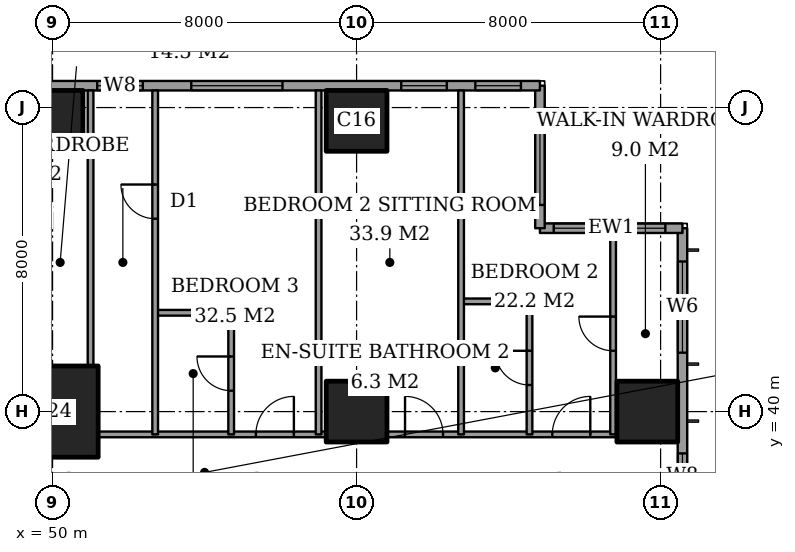
"""IFC4 building model, lengths in metres.
Left out: names, types, materials, properties, quantities, classifications, styles, units other than length and angle.
Written with IfcOpenShell. Run it as: python <this file> out.ifc"""

import sys

from ifc_helpers import new_model, si_unit, direction, frame, frame_2d, origin, origin_2d, place, context, subcontext, project, spatial, rectangle, extrude, element, fill, save


model = new_model("IFC4")
c1 = context("Model", 3, precision=1e-05, world=origin(), true_north=direction((0.0, 1.0)))
c2 = subcontext(c1, "Body", "Model", "MODEL_VIEW")
j1 = project(units=[si_unit("LENGTHUNIT", "METRE"), si_unit("PLANEANGLEUNIT", "RADIAN")], contexts=[c1])
p1 = place(None, origin())
s1 = spatial("IfcSite", under=j1, at=p1, CompositionType="ELEMENT")
p2 = place(p1, origin())
s2 = spatial("IfcBuilding", under=s1, at=p2, CompositionType="ELEMENT")
p3 = place(p2, frame((0.0, 0.0, 259.2)))
s3 = spatial("IfcBuildingStorey", under=s2, at=p3, CompositionType="ELEMENT", Elevation=259.2)
p4 = place(p3, frame((50.0, 40.0, 0.0), z_axis=(0.0, 0.0, 1.0), x_axis=(1.0, 0.0, 0.0)))
e1 = element("IfcColumn", 1, at=p4, inside=s3, PredefinedType="COLUMN", context=c2, shape_type="SweptSolid", body=[
    extrude(rectangle(XDim=2.4, YDim=2.4, at=origin_2d()), origin(), (0.0, 0.0, 1.0), 3.6),
])
for number, where, z_axis, x_axis in (
    (2, (50.0, 47.65, 0.0), (0.0, 0.0, 1.0), (1.0, 0.0, 0.0)),
    (3, (58.0, 40.0, 0.0), (0.0, 0.0, 1.0), (1.0, 0.0, 0.0)),
    (4, (58.0, 47.65, 0.0), (0.0, 0.0, 1.0), (1.0, 0.0, 0.0)),
    (5, (65.65, 40.0, 0.0), (0.0, 0.0, 1.0), (1.0, 0.0, 0.0)),
):
    element("IfcColumn", number, at=place(p3, frame(where, z_axis=z_axis, x_axis=x_axis)), inside=s3, PredefinedType="COLUMN", context=c2, shape_type="SweptSolid", body=[
        extrude(rectangle(XDim=1.6, YDim=1.6, at=origin_2d()), origin(), (0.0, 0.0, 1.0), 3.6),
    ])
p5 = place(p3, frame((66.575, 3.175, 0.0), z_axis=(0.0, 0.0, 1.0), x_axis=(0.0, 1.0, 0.0)))
e6 = element("IfcWall", 6, at=p5, inside=s3, PredefinedType="SOLIDWALL", context=c2, shape_type="SweptSolid", body=[
    extrude(rectangle(XDim=41.65, YDim=0.25, at=frame_2d((20.825, 0.0))), origin(), (0.0, 0.0, 1.0), 3.6),
])
p6 = place(p5, frame((0.875, 0.0, 0.6)))
e7 = element("IfcOpeningElement", 7, at=p6, cuts=e6, PredefinedType="OPENING", context=c2, shape_type="SweptSolid", body=[
    extrude(rectangle(XDim=2.4, YDim=2.0, at=frame_2d((1.2, 1.0))), frame((0.0, 0.135, 0.0), z_axis=(0.0, -1.0, 0.0), x_axis=(1.0, 0.0, 0.0)), (0.0, 0.0, 1.0), 0.27),
])
p7 = place(p5, frame((6.6, 0.0, 0.6)))
e8 = element("IfcOpeningElement", 8, at=p7, cuts=e6, PredefinedType="OPENING", context=c2, shape_type="SweptSolid", body=[
    extrude(rectangle(XDim=1.2, YDim=2.0, at=frame_2d((0.6, 1.0))), frame((0.0, 0.135, 0.0), z_axis=(0.0, -1.0, 0.0), x_axis=(1.0, 0.0, 0.0)), (0.0, 0.0, 1.0), 0.27),
])
p8 = place(p5, frame((8.825, 0.0, 0.6)))
e9 = element("IfcOpeningElement", 9, at=p8, cuts=e6, PredefinedType="OPENING", context=c2, shape_type="SweptSolid", body=[
    extrude(rectangle(XDim=2.4, YDim=2.0, at=frame_2d((1.2, 1.0))), frame((0.0, 0.135, 0.0), z_axis=(0.0, -1.0, 0.0), x_axis=(1.0, 0.0, 0.0)), (0.0, 0.0, 1.0), 0.27),
])
p9 = place(p5, frame((15.725, 0.0, 0.6)))
e10 = element("IfcOpeningElement", 10, at=p9, cuts=e6, PredefinedType="OPENING", context=c2, shape_type="SweptSolid", body=[
    extrude(rectangle(XDim=2.4, YDim=2.0, at=frame_2d((1.2, 1.0))), frame((0.0, 0.135, 0.0), z_axis=(0.0, -1.0, 0.0), x_axis=(1.0, 0.0, 0.0)), (0.0, 0.0, 1.0), 0.27),
])
p10 = place(p5, frame((23.625, 0.0, 0.6)))
e11 = element("IfcOpeningElement", 11, at=p10, cuts=e6, PredefinedType="OPENING", context=c2, shape_type="SweptSolid", body=[
    extrude(rectangle(XDim=2.4, YDim=2.0, at=frame_2d((1.2, 1.0))), frame((0.0, 0.135, 0.0), z_axis=(0.0, -1.0, 0.0), x_axis=(1.0, 0.0, 0.0)), (0.0, 0.0, 1.0), 0.27),
])
p11 = place(p5, frame((30.725, 0.0, 0.6)))
e12 = element("IfcOpeningElement", 12, at=p11, cuts=e6, PredefinedType="OPENING", context=c2, shape_type="SweptSolid", body=[
    extrude(rectangle(XDim=2.4, YDim=2.0, at=frame_2d((1.2, 1.0))), frame((0.0, 0.135, 0.0), z_axis=(0.0, -1.0, 0.0), x_axis=(1.0, 0.0, 0.0)), (0.0, 0.0, 1.0), 0.27),
])
p12 = place(p5, frame((34.525, 0.0, 0.6)))
e13 = element("IfcOpeningElement", 13, at=p12, cuts=e6, PredefinedType="OPENING", context=c2, shape_type="SweptSolid", body=[
    extrude(rectangle(XDim=1.2, YDim=2.0, at=frame_2d((0.6, 1.0))), frame((0.0, 0.135, 0.0), z_axis=(0.0, -1.0, 0.0), x_axis=(1.0, 0.0, 0.0)), (0.0, 0.0, 1.0), 0.27),
])
p13 = place(p5, frame((38.375, 0.0, 0.6)))
e14 = element("IfcOpeningElement", 14, at=p13, cuts=e6, PredefinedType="OPENING", context=c2, shape_type="SweptSolid", body=[
    extrude(rectangle(XDim=2.4, YDim=2.0, at=frame_2d((1.2, 1.0))), frame((0.0, 0.135, 0.0), z_axis=(0.0, -1.0, 0.0), x_axis=(1.0, 0.0, 0.0)), (0.0, 0.0, 1.0), 0.27),
])
p14 = place(p3, frame((66.575, 44.825, 0.0), z_axis=(0.0, 0.0, 1.0), x_axis=(-1.0, 0.0, 0.0)))
e15 = element("IfcWall", 15, at=p14, inside=s3, PredefinedType="SOLIDWALL", context=c2, shape_type="SweptSolid", body=[
    extrude(rectangle(XDim=3.75, YDim=0.25, at=frame_2d((1.875, 0.0))), origin(), (0.0, 0.0, 1.0), 3.6),
])
p15 = place(p14, frame((0.45, 0.0, 0.6)))
e16 = element("IfcOpeningElement", 16, at=p15, cuts=e15, PredefinedType="OPENING", context=c2, shape_type="SweptSolid", body=[
    extrude(rectangle(XDim=1.2, YDim=2.0, at=frame_2d((0.6, 1.0))), frame((0.0, 0.135, 0.0), z_axis=(0.0, -1.0, 0.0), x_axis=(1.0, 0.0, 0.0)), (0.0, 0.0, 1.0), 0.27),
])
p16 = place(p14, frame((2.188, 0.0, 0.6)))
e17 = element("IfcOpeningElement", 17, at=p16, cuts=e15, PredefinedType="OPENING", context=c2, shape_type="SweptSolid", body=[
    extrude(rectangle(XDim=1.2, YDim=2.0, at=frame_2d((0.6, 1.0))), frame((0.0, 0.135, 0.0), z_axis=(0.0, -1.0, 0.0), x_axis=(1.0, 0.0, 0.0)), (0.0, 0.0, 1.0), 0.27),
])
p17 = place(p3, frame((62.825, 44.825, 0.0), z_axis=(0.0, 0.0, 1.0), x_axis=(0.0, 1.0, 0.0)))
e18 = element("IfcWall", 18, at=p17, inside=s3, PredefinedType="SOLIDWALL", context=c2, shape_type="SweptSolid", body=[
    extrude(rectangle(XDim=3.75, YDim=0.25, at=frame_2d((1.875, 0.0))), origin(), (0.0, 0.0, 1.0), 3.6),
])
p18 = place(p17, frame((0.613, 0.0, 0.6)))
e19 = element("IfcOpeningElement", 19, at=p18, cuts=e18, PredefinedType="OPENING", context=c2, shape_type="SweptSolid", body=[
    extrude(rectangle(XDim=2.4, YDim=2.0, at=frame_2d((1.2, 1.0))), frame((0.0, 0.135, 0.0), z_axis=(0.0, -1.0, 0.0), x_axis=(1.0, 0.0, 0.0)), (0.0, 0.0, 1.0), 0.27),
])
p19 = place(p3, frame((62.825, 48.575, 0.0), z_axis=(0.0, 0.0, 1.0), x_axis=(-1.0, 0.0, 0.0)))
e20 = element("IfcWall", 20, at=p19, inside=s3, PredefinedType="SOLIDWALL", context=c2, shape_type="SweptSolid", body=[
    extrude(rectangle(XDim=21.4, YDim=0.25, at=frame_2d((10.7, 0.0))), origin(), (0.0, 0.0, 1.0), 3.6),
])
p20 = place(p19, frame((0.5, 0.0, 0.6)))
e21 = element("IfcOpeningElement", 21, at=p20, cuts=e20, PredefinedType="OPENING", context=c2, shape_type="SweptSolid", body=[
    extrude(rectangle(XDim=1.2, YDim=2.0, at=frame_2d((0.6, 1.0))), frame((0.0, 0.135, 0.0), z_axis=(0.0, -1.0, 0.0), x_axis=(1.0, 0.0, 0.0)), (0.0, 0.0, 1.0), 0.27),
])
p21 = place(p19, frame((2.45, 0.0, 0.6)))
e22 = element("IfcOpeningElement", 22, at=p21, cuts=e20, PredefinedType="OPENING", context=c2, shape_type="SweptSolid", body=[
    extrude(rectangle(XDim=1.2, YDim=2.0, at=frame_2d((0.6, 1.0))), frame((0.0, 0.135, 0.0), z_axis=(0.0, -1.0, 0.0), x_axis=(1.0, 0.0, 0.0)), (0.0, 0.0, 1.0), 0.27),
])
p22 = place(p19, frame((6.775, 0.0, 0.6)))
e23 = element("IfcOpeningElement", 23, at=p22, cuts=e20, PredefinedType="OPENING", context=c2, shape_type="SweptSolid", body=[
    extrude(rectangle(XDim=2.4, YDim=2.0, at=frame_2d((1.2, 1.0))), frame((0.0, 0.135, 0.0), z_axis=(0.0, -1.0, 0.0), x_axis=(1.0, 0.0, 0.0)), (0.0, 0.0, 1.0), 0.27),
])
p23 = place(p19, frame((10.45, 0.0, 0.6)))
e24 = element("IfcOpeningElement", 24, at=p23, cuts=e20, PredefinedType="OPENING", context=c2, shape_type="SweptSolid", body=[
    extrude(rectangle(XDim=1.2, YDim=2.0, at=frame_2d((0.6, 1.0))), frame((0.0, 0.135, 0.0), z_axis=(0.0, -1.0, 0.0), x_axis=(1.0, 0.0, 0.0)), (0.0, 0.0, 1.0), 0.27),
])
p24 = place(p19, frame((14.375, 0.0, 0.6)))
e25 = element("IfcOpeningElement", 25, at=p24, cuts=e20, PredefinedType="OPENING", context=c2, shape_type="SweptSolid", body=[
    extrude(rectangle(XDim=2.4, YDim=2.0, at=frame_2d((1.2, 1.0))), frame((0.0, 0.135, 0.0), z_axis=(0.0, -1.0, 0.0), x_axis=(1.0, 0.0, 0.0)), (0.0, 0.0, 1.0), 0.27),
])
p25 = place(p19, frame((17.9, 0.0, 0.6)))
e26 = element("IfcOpeningElement", 26, at=p25, cuts=e20, PredefinedType="OPENING", context=c2, shape_type="SweptSolid", body=[
    extrude(rectangle(XDim=1.2, YDim=2.0, at=frame_2d((0.6, 1.0))), frame((0.0, 0.135, 0.0), z_axis=(0.0, -1.0, 0.0), x_axis=(1.0, 0.0, 0.0)), (0.0, 0.0, 1.0), 0.27),
])
p26 = place(p3, frame((51.2, 39.4, 0.0), z_axis=(0.0, 0.0, 1.0), x_axis=(1.0, 0.0, 0.0)))
e27 = element("IfcWall", 27, at=p26, inside=s3, PredefinedType="PARTITIONING", context=c2, shape_type="SweptSolid", body=[
    extrude(rectangle(XDim=6.0, YDim=0.15, at=frame_2d((3.0, 0.0))), origin(), (0.0, 0.0, 1.0), 3.35),
])
p27 = place(p26, frame((4.15, 0.0, 0.0)))
e28 = element("IfcOpeningElement", 28, at=p27, cuts=e27, PredefinedType="OPENING", context=c2, shape_type="SweptSolid", body=[
    extrude(rectangle(XDim=1.0, YDim=2.1, at=frame_2d((0.5, 1.05))), frame((0.0, 0.085, 0.0), z_axis=(0.0, -1.0, 0.0), x_axis=(1.0, 0.0, 0.0)), (0.0, 0.0, 1.0), 0.17),
])
p28 = place(p3, frame((58.8, 39.4, 0.0), z_axis=(0.0, 0.0, 1.0), x_axis=(1.0, 0.0, 0.0)))
e29 = element("IfcWall", 29, at=p28, inside=s3, PredefinedType="PARTITIONING", context=c2, shape_type="SweptSolid", body=[
    extrude(rectangle(XDim=6.05, YDim=0.15, at=frame_2d((3.025, 0.0))), origin(), (0.0, 0.0, 1.0), 3.35),
])
p29 = place(p28, frame((4.35, 0.0, 0.0)))
e30 = element("IfcOpeningElement", 30, at=p29, cuts=e29, PredefinedType="OPENING", context=c2, shape_type="SweptSolid", body=[
    extrude(rectangle(XDim=1.0, YDim=2.1, at=frame_2d((0.5, 1.05))), frame((0.0, 0.085, 0.0), z_axis=(0.0, -1.0, 0.0), x_axis=(1.0, 0.0, 0.0)), (0.0, 0.0, 1.0), 0.17),
])
p30 = place(p28, frame((0.475, 0.0, 0.0)))
e31 = element("IfcOpeningElement", 31, at=p30, cuts=e29, PredefinedType="OPENING", context=c2, shape_type="SweptSolid", body=[
    extrude(rectangle(XDim=1.0, YDim=2.1, at=frame_2d((0.5, 1.05))), frame((0.0, 0.085, 0.0), z_axis=(0.0, -1.0, 0.0), x_axis=(1.0, 0.0, 0.0)), (0.0, 0.0, 1.0), 0.17),
])
p31 = place(p3, frame((52.7, 42.6, 0.0), z_axis=(0.0, 0.0, 1.0), x_axis=(1.0, 0.0, 0.0)))
e32 = element("IfcWall", 32, at=p31, inside=s3, PredefinedType="PARTITIONING", context=c2, shape_type="SweptSolid", body=[
    extrude(rectangle(XDim=2.0, YDim=0.15, at=frame_2d((1.0, 0.0))), origin(), (0.0, 0.0, 1.0), 3.35),
])
p32 = place(p3, frame((60.75, 42.9, 0.0), z_axis=(0.0, 0.0, 1.0), x_axis=(1.0, 0.0, 0.0)))
e33 = element("IfcWall", 33, at=p32, inside=s3, PredefinedType="PARTITIONING", context=c2, shape_type="SweptSolid", body=[
    extrude(rectangle(XDim=1.8, YDim=0.15, at=frame_2d((0.9, 0.0))), origin(), (0.0, 0.0, 1.0), 3.35),
])
p33 = place(p3, frame((51.0, 41.2, 0.0), z_axis=(0.0, 0.0, 1.0), x_axis=(0.0, 1.0, 0.0)))
e34 = element("IfcWall", 34, at=p33, inside=s3, PredefinedType="PARTITIONING", context=c2, shape_type="SweptSolid", body=[
    extrude(rectangle(XDim=7.25, YDim=0.15, at=frame_2d((3.625, 0.0))), origin(), (0.0, 0.0, 1.0), 3.35),
])
p34 = place(p3, frame((52.7, 39.4, 0.0), z_axis=(0.0, 0.0, 1.0), x_axis=(0.0, 1.0, 0.0)))
e35 = element("IfcWall", 35, at=p34, inside=s3, PredefinedType="PARTITIONING", context=c2, shape_type="SweptSolid", body=[
    extrude(rectangle(XDim=9.05, YDim=0.15, at=frame_2d((4.525, 0.0))), origin(), (0.0, 0.0, 1.0), 3.35),
])
p35 = place(p34, frame((5.675, 0.0, 0.0)))
e36 = element("IfcOpeningElement", 36, at=p35, cuts=e35, PredefinedType="OPENING", context=c2, shape_type="SweptSolid", body=[
    extrude(rectangle(XDim=0.9, YDim=2.1, at=frame_2d((0.45, 1.05))), frame((0.0, 0.085, 0.0), z_axis=(0.0, -1.0, 0.0), x_axis=(1.0, 0.0, 0.0)), (0.0, 0.0, 1.0), 0.17),
])
p36 = place(p3, frame((54.7, 39.4, 0.0), z_axis=(0.0, 0.0, 1.0), x_axis=(0.0, 1.0, 0.0)))
e37 = element("IfcWall", 37, at=p36, inside=s3, PredefinedType="PARTITIONING", context=c2, shape_type="SweptSolid", body=[
    extrude(rectangle(XDim=3.2, YDim=0.15, at=frame_2d((1.6, 0.0))), origin(), (0.0, 0.0, 1.0), 3.35),
])
p37 = place(p36, frame((1.15, 0.0, 0.0)))
e38 = element("IfcOpeningElement", 38, at=p37, cuts=e37, PredefinedType="OPENING", context=c2, shape_type="SweptSolid", body=[
    extrude(rectangle(XDim=0.9, YDim=2.1, at=frame_2d((0.45, 1.05))), frame((0.0, 0.085, 0.0), z_axis=(0.0, -1.0, 0.0), x_axis=(1.0, 0.0, 0.0)), (0.0, 0.0, 1.0), 0.17),
])
for number, where, z_axis, x_axis in (
    (39, (57.0, 39.4, 0.0), (0.0, 0.0, 1.0), (0.0, 1.0, 0.0)),
    (40, (60.75, 39.4, 0.0), (0.0, 0.0, 1.0), (0.0, 1.0, 0.0)),
):
    element("IfcWall", number, at=place(p3, frame(where, z_axis=z_axis, x_axis=x_axis)), inside=s3, PredefinedType="PARTITIONING", context=c2, shape_type="SweptSolid", body=[
        extrude(rectangle(XDim=9.05, YDim=0.15, at=frame_2d((4.525, 0.0))), origin(), (0.0, 0.0, 1.0), 3.35),
    ])
p38 = place(p3, frame((62.55, 39.4, 0.0), z_axis=(0.0, 0.0, 1.0), x_axis=(0.0, 1.0, 0.0)))
e41 = element("IfcWall", 41, at=p38, inside=s3, PredefinedType="PARTITIONING", context=c2, shape_type="SweptSolid", body=[
    extrude(rectangle(XDim=3.5, YDim=0.15, at=frame_2d((1.75, 0.0))), origin(), (0.0, 0.0, 1.0), 3.35),
])
p39 = place(p38, frame((1.3, 0.0, 0.0)))
e42 = element("IfcOpeningElement", 42, at=p39, cuts=e41, PredefinedType="OPENING", context=c2, shape_type="SweptSolid", body=[
    extrude(rectangle(XDim=0.9, YDim=2.1, at=frame_2d((0.45, 1.05))), frame((0.0, 0.085, 0.0), z_axis=(0.0, -1.0, 0.0), x_axis=(1.0, 0.0, 0.0)), (0.0, 0.0, 1.0), 0.17),
])
p40 = place(p3, frame((64.75, 39.4, 0.0), z_axis=(0.0, 0.0, 1.0), x_axis=(0.0, 1.0, 0.0)))
e43 = element("IfcWall", 43, at=p40, inside=s3, PredefinedType="PARTITIONING", context=c2, shape_type="SweptSolid", body=[
    extrude(rectangle(XDim=5.3, YDim=0.15, at=frame_2d((2.65, 0.0))), origin(), (0.0, 0.0, 1.0), 3.35),
])
p41 = place(p40, frame((2.2, 0.0, 0.0)))
e44 = element("IfcOpeningElement", 44, at=p41, cuts=e43, PredefinedType="OPENING", context=c2, shape_type="SweptSolid", body=[
    extrude(rectangle(XDim=0.9, YDim=2.1, at=frame_2d((0.45, 1.05))), frame((0.0, 0.085, 0.0), z_axis=(0.0, -1.0, 0.0), x_axis=(1.0, 0.0, 0.0)), (0.0, 0.0, 1.0), 0.17),
])
p42 = place(p12, origin())
e45 = element("IfcWindow", 45, at=p42, inside=s3, PartitioningType="SINGLE_PANEL", PredefinedType="WINDOW", context=c2, shape_type="SweptSolid", body=[
    extrude(rectangle(XDim=1.2, YDim=2.0, at=frame_2d((0.6, 1.0))), frame((0.0, 0.03, 0.0), z_axis=(0.0, -1.0, 0.0), x_axis=(1.0, 0.0, 0.0)), (0.0, 0.0, 1.0), 0.06),
])
fill(e13, e45)
p43 = place(p13, origin())
e46 = element("IfcWindow", 46, at=p43, inside=s3, PartitioningType="SINGLE_PANEL", PredefinedType="WINDOW", context=c2, shape_type="SweptSolid", body=[
    extrude(rectangle(XDim=2.4, YDim=2.0, at=frame_2d((1.2, 1.0))), frame((0.0, 0.03, 0.0), z_axis=(0.0, -1.0, 0.0), x_axis=(1.0, 0.0, 0.0)), (0.0, 0.0, 1.0), 0.06),
])
fill(e14, e46)
p44 = place(p15, origin())
e47 = element("IfcWindow", 47, at=p44, inside=s3, PartitioningType="SINGLE_PANEL", PredefinedType="WINDOW", context=c2, shape_type="SweptSolid", body=[
    extrude(rectangle(XDim=1.2, YDim=2.0, at=frame_2d((0.6, 1.0))), frame((0.0, 0.03, 0.0), z_axis=(0.0, -1.0, 0.0), x_axis=(1.0, 0.0, 0.0)), (0.0, 0.0, 1.0), 0.06),
])
fill(e16, e47)
p45 = place(p16, origin())
e48 = element("IfcWindow", 48, at=p45, inside=s3, PartitioningType="SINGLE_PANEL", PredefinedType="WINDOW", context=c2, shape_type="SweptSolid", body=[
    extrude(rectangle(XDim=1.2, YDim=2.0, at=frame_2d((0.6, 1.0))), frame((0.0, 0.03, 0.0), z_axis=(0.0, -1.0, 0.0), x_axis=(1.0, 0.0, 0.0)), (0.0, 0.0, 1.0), 0.06),
])
fill(e17, e48)
p46 = place(p18, origin())
e49 = element("IfcWindow", 49, at=p46, inside=s3, PartitioningType="SINGLE_PANEL", PredefinedType="WINDOW", context=c2, shape_type="SweptSolid", body=[
    extrude(rectangle(XDim=2.4, YDim=2.0, at=frame_2d((1.2, 1.0))), frame((0.0, 0.03, 0.0), z_axis=(0.0, -1.0, 0.0), x_axis=(1.0, 0.0, 0.0)), (0.0, 0.0, 1.0), 0.06),
])
fill(e19, e49)
p47 = place(p20, origin())
e50 = element("IfcWindow", 50, at=p47, inside=s3, PartitioningType="SINGLE_PANEL", PredefinedType="WINDOW", context=c2, shape_type="SweptSolid", body=[
    extrude(rectangle(XDim=1.2, YDim=2.0, at=frame_2d((0.6, 1.0))), frame((0.0, 0.03, 0.0), z_axis=(0.0, -1.0, 0.0), x_axis=(1.0, 0.0, 0.0)), (0.0, 0.0, 1.0), 0.06),
])
fill(e21, e50)
p48 = place(p21, origin())
e51 = element("IfcWindow", 51, at=p48, inside=s3, PartitioningType="SINGLE_PANEL", PredefinedType="WINDOW", context=c2, shape_type="SweptSolid", body=[
    extrude(rectangle(XDim=1.2, YDim=2.0, at=frame_2d((0.6, 1.0))), frame((0.0, 0.03, 0.0), z_axis=(0.0, -1.0, 0.0), x_axis=(1.0, 0.0, 0.0)), (0.0, 0.0, 1.0), 0.06),
])
fill(e22, e51)
p49 = place(p22, origin())
e52 = element("IfcWindow", 52, at=p49, inside=s3, PartitioningType="SINGLE_PANEL", PredefinedType="WINDOW", context=c2, shape_type="SweptSolid", body=[
    extrude(rectangle(XDim=2.4, YDim=2.0, at=frame_2d((1.2, 1.0))), frame((0.0, 0.03, 0.0), z_axis=(0.0, -1.0, 0.0), x_axis=(1.0, 0.0, 0.0)), (0.0, 0.0, 1.0), 0.06),
])
fill(e23, e52)
p50 = place(p23, origin())
e53 = element("IfcWindow", 53, at=p50, inside=s3, PartitioningType="SINGLE_PANEL", PredefinedType="WINDOW", context=c2, shape_type="SweptSolid", body=[
    extrude(rectangle(XDim=1.2, YDim=2.0, at=frame_2d((0.6, 1.0))), frame((0.0, 0.03, 0.0), z_axis=(0.0, -1.0, 0.0), x_axis=(1.0, 0.0, 0.0)), (0.0, 0.0, 1.0), 0.06),
])
fill(e24, e53)
p51 = place(p41, origin())
e54 = element("IfcDoor", 54, at=p51, inside=s3, OperationType="SINGLE_SWING_LEFT", PredefinedType="DOOR", context=c2, shape_type="SweptSolid", body=[
    extrude(rectangle(XDim=0.9, YDim=2.1, at=frame_2d((0.45, 1.05))), frame((0.0, 0.025, 0.0), z_axis=(0.0, -1.0, 0.0), x_axis=(1.0, 0.0, 0.0)), (0.0, 0.0, 1.0), 0.05),
])
fill(e44, e54)
p52 = place(p39, origin())
e55 = element("IfcDoor", 55, at=p52, inside=s3, OperationType="SINGLE_SWING_LEFT", PredefinedType="DOOR", context=c2, shape_type="SweptSolid", body=[
    extrude(rectangle(XDim=0.9, YDim=2.1, at=frame_2d((0.45, 1.05))), frame((0.0, 0.025, 0.0), z_axis=(0.0, -1.0, 0.0), x_axis=(1.0, 0.0, 0.0)), (0.0, 0.0, 1.0), 0.05),
])
fill(e42, e55)
p53 = place(p29, origin())
e56 = element("IfcDoor", 56, at=p53, inside=s3, OperationType="SINGLE_SWING_LEFT", PredefinedType="DOOR", context=c2, shape_type="SweptSolid", body=[
    extrude(rectangle(XDim=1.0, YDim=2.1, at=frame_2d((0.5, 1.05))), frame((0.0, 0.025, 0.0), z_axis=(0.0, -1.0, 0.0), x_axis=(1.0, 0.0, 0.0)), (0.0, 0.0, 1.0), 0.05),
])
fill(e30, e56)
p54 = place(p30, origin())
e57 = element("IfcDoor", 57, at=p54, inside=s3, OperationType="SINGLE_SWING_RIGHT", PredefinedType="DOOR", context=c2, shape_type="SweptSolid", body=[
    extrude(rectangle(XDim=1.0, YDim=2.1, at=frame_2d((0.5, 1.05))), frame((0.0, 0.025, 0.0), z_axis=(0.0, -1.0, 0.0), x_axis=(1.0, 0.0, 0.0)), (0.0, 0.0, 1.0), 0.05),
])
fill(e31, e57)
p55 = place(p37, origin())
e58 = element("IfcDoor", 58, at=p55, inside=s3, OperationType="SINGLE_SWING_LEFT", PredefinedType="DOOR", context=c2, shape_type="SweptSolid", body=[
    extrude(rectangle(XDim=0.9, YDim=2.1, at=frame_2d((0.45, 1.05))), frame((0.0, 0.025, 0.0), z_axis=(0.0, -1.0, 0.0), x_axis=(1.0, 0.0, 0.0)), (0.0, 0.0, 1.0), 0.05),
])
fill(e38, e58)
p56 = place(p27, origin())
e59 = element("IfcDoor", 59, at=p56, inside=s3, OperationType="SINGLE_SWING_LEFT", PredefinedType="DOOR", context=c2, shape_type="SweptSolid", body=[
    extrude(rectangle(XDim=1.0, YDim=2.1, at=frame_2d((0.5, 1.05))), frame((0.0, 0.025, 0.0), z_axis=(0.0, -1.0, 0.0), x_axis=(1.0, 0.0, 0.0)), (0.0, 0.0, 1.0), 0.05),
])
fill(e28, e59)
p57 = place(p35, origin())
e60 = element("IfcDoor", 60, at=p57, inside=s3, OperationType="SINGLE_SWING_LEFT", PredefinedType="DOOR", context=c2, shape_type="SweptSolid", body=[
    extrude(rectangle(XDim=0.9, YDim=2.1, at=frame_2d((0.45, 1.05))), frame((0.0, 0.025, 0.0), z_axis=(0.0, -1.0, 0.0), x_axis=(1.0, 0.0, 0.0)), (0.0, 0.0, 1.0), 0.05),
])
fill(e36, e60)
save(model, sys.argv[1])
